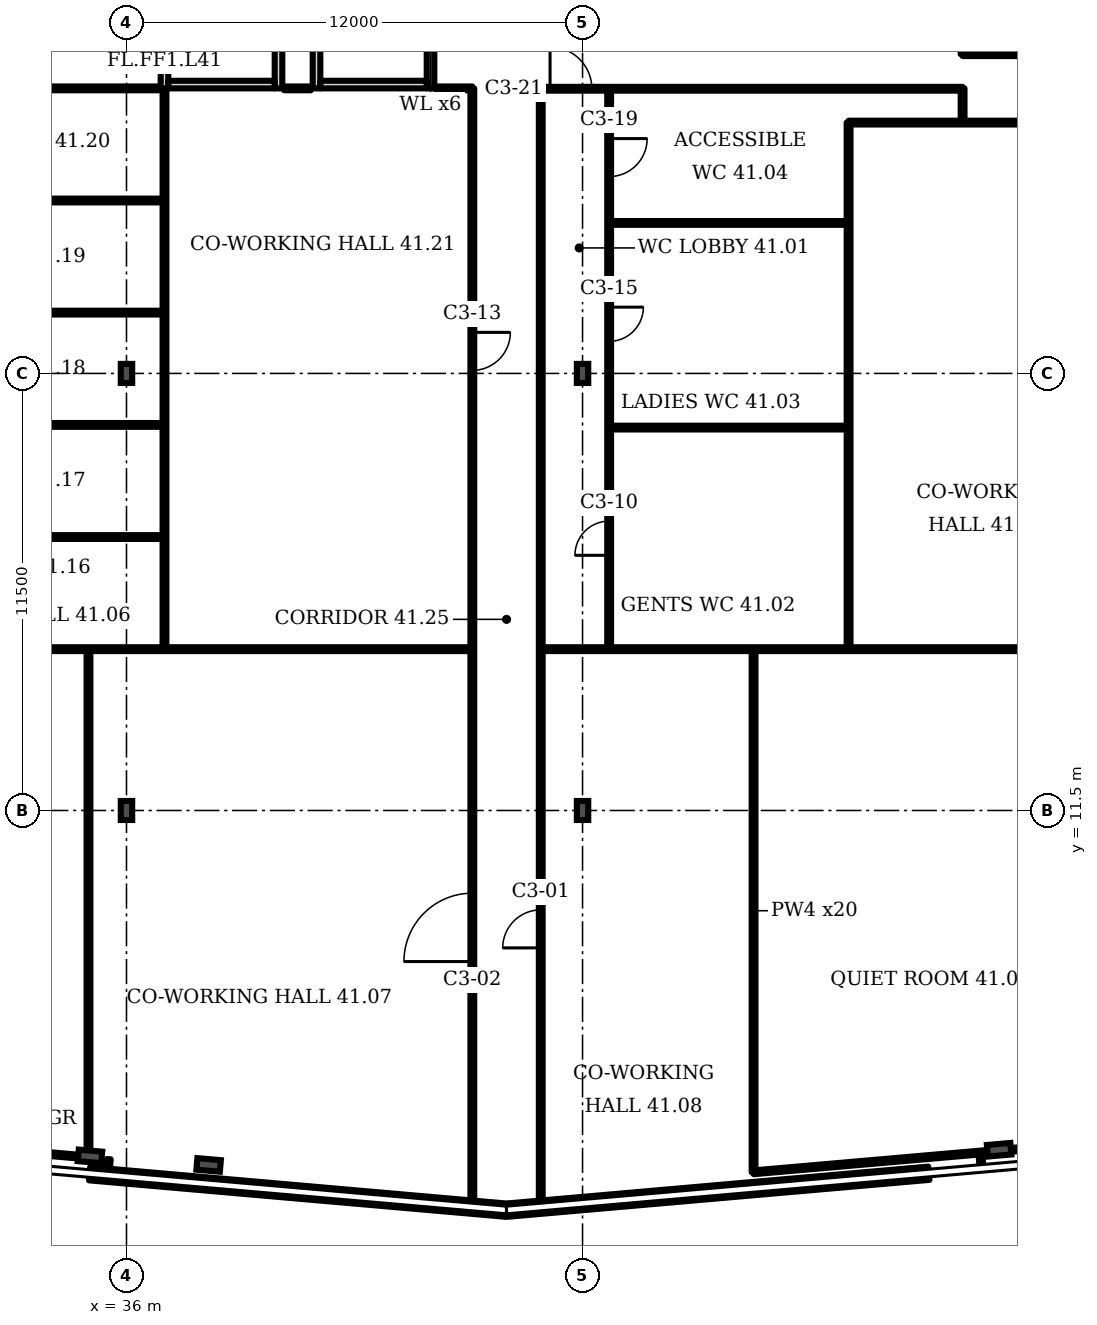
"""IFC4 building model, lengths in metres.
Left out: names, types, materials, properties, quantities, classifications, styles, units other than length and angle.
Written with IfcOpenShell. Run it as: python <this file> out.ifc"""

import sys

from ifc_helpers import new_model, si_unit, direction, frame, frame_2d, origin, origin_2d, place, context, subcontext, project, spatial, rectangle, i_section, extrude, element, fill, save


model = new_model("IFC4")
c1 = context("Model", 3, precision=1e-05, world=origin(), true_north=direction((0.0, 1.0)))
c2 = subcontext(c1, "Body", "Model", "MODEL_VIEW")
j1 = project(units=[si_unit("LENGTHUNIT", "METRE"), si_unit("PLANEANGLEUNIT", "RADIAN")], contexts=[c1])
p1 = place(None, origin())
s1 = spatial("IfcSite", under=j1, at=p1, CompositionType="ELEMENT")
p2 = place(p1, origin())
s2 = spatial("IfcBuilding", under=s1, at=p2, CompositionType="ELEMENT")
p3 = place(p2, frame((0.0, 0.0, 169.9)))
s3 = spatial("IfcBuildingStorey", under=s2, at=p3, CompositionType="ELEMENT", Elevation=169.9)
for number, where, z_axis, x_axis in (
    (1, (35.039, 2.399, 0.0), (0.0, 0.0, 1.0), (-0.087, -0.996, 0.0)),
    (2, (38.161, 2.174, 0.0), (0.0, 0.0, 1.0), (-0.087, -0.996, 0.0)),
    (3, (58.961, 2.573, 0.0), (0.0, 0.0, 1.0), (0.087, -0.996, 0.0)),
):
    element("IfcColumn", number, at=place(p3, frame(where, z_axis=z_axis, x_axis=x_axis)), inside=s3, PredefinedType="COLUMN", context=c2, shape_type="SweptSolid", body=[
        extrude(i_section(OverallWidth=0.305, OverallDepth=0.62, WebThickness=0.021, FlangeThickness=0.04, FilletRadius=0.027, at=origin_2d()), origin(), (0.0, 0.0, 1.0), 3.6),
    ])
for number, where, z_axis, x_axis in (
    (4, (36.0, 11.5, 0.0), (0.0, 0.0, 1.0), (1.0, 0.0, 0.0)),
    (5, (48.0, 11.5, 0.0), (0.0, 0.0, 1.0), (1.0, 0.0, 0.0)),
    (6, (36.0, 23.0, 0.0), (0.0, 0.0, 1.0), (1.0, 0.0, 0.0)),
    (7, (48.0, 23.0, 0.0), (0.0, 0.0, 1.0), (1.0, 0.0, 0.0)),
):
    element("IfcColumn", number, at=place(p3, frame(where, z_axis=z_axis, x_axis=x_axis)), inside=s3, PredefinedType="COLUMN", context=c2, shape_type="SweptSolid", body=[
        extrude(i_section(OverallWidth=0.3, OverallDepth=0.5, WebThickness=0.014, FlangeThickness=0.028, FilletRadius=0.027, at=origin_2d()), origin(), (0.0, 0.0, 1.0), 3.6),
    ])
p4 = place(p3, frame((35.03, 1.943, 0.0), z_axis=(0.0, 0.0, 1.0), x_axis=(0.996199, -0.08714, 0.0)))
e8 = element("IfcWall", 8, at=p4, inside=s3, PredefinedType="SOLIDWALL", context=c2, shape_type="SweptSolid", body=[
    extrude(rectangle(XDim=11.028, YDim=0.35, at=frame_2d((5.514, 0.0))), origin(), (0.0, 0.0, 1.0), 1.0),
])
p5 = place(p3, frame((46.045, 0.987, 0.0), z_axis=(0.0, 0.0, 1.0), x_axis=(0.996193, 0.087171, 0.0)))
e9 = element("IfcWall", 9, at=p5, inside=s3, PredefinedType="SOLIDWALL", context=c2, shape_type="SweptSolid", body=[
    extrude(rectangle(XDim=11.11, YDim=0.35, at=frame_2d((5.555, 0.0))), origin(), (0.0, 0.0, 1.0), 1.0),
])
p6 = place(p3, frame((37.0, 30.5, 0.0), z_axis=(0.0, 0.0, 1.0), x_axis=(0.0, 1.0, 0.0)))
e10 = element("IfcWall", 10, at=p6, inside=s3, PredefinedType="PARTITIONING", context=c2, shape_type="SweptSolid", body=[
    extrude(rectangle(XDim=3.5, YDim=0.2, at=frame_2d((1.75, 0.0))), origin(), (0.0, 0.0, 1.0), 3.2),
])
p7 = place(p6, frame((1.2, 0.0, 0.0)))
e11 = element("IfcOpeningElement", 11, at=p7, cuts=e10, PredefinedType="OPENING", context=c2, shape_type="SweptSolid", body=[
    extrude(rectangle(XDim=1.1, YDim=2.1, at=frame_2d((0.55, 1.05))), frame((0.0, 0.11, 0.0), z_axis=(0.0, -1.0, 0.0), x_axis=(1.0, 0.0, 0.0)), (0.0, 0.0, 1.0), 0.22),
])
p8 = place(p3, frame((40.0, 30.5, 0.0), z_axis=(0.0, 0.0, 1.0), x_axis=(0.0, 1.0, 0.0)))
e12 = element("IfcWall", 12, at=p8, inside=s3, PredefinedType="PARTITIONING", context=c2, shape_type="SweptSolid", body=[
    extrude(rectangle(XDim=3.5, YDim=0.2, at=frame_2d((1.75, 0.0))), origin(), (0.0, 0.0, 1.0), 3.2),
])
p9 = place(p3, frame((37.1, 30.6, 0.0), z_axis=(0.0, 0.0, 1.0), x_axis=(1.0, 0.0, 0.0)))
e13 = element("IfcWall", 13, at=p9, inside=s3, PredefinedType="PARTITIONING", context=c2, shape_type="SweptSolid", body=[
    extrude(rectangle(XDim=2.8, YDim=0.2, at=frame_2d((1.4, 0.0))), origin(), (0.0, 0.0, 1.0), 3.2),
])
p10 = place(p3, frame((41.0, 30.5, 0.0), z_axis=(0.0, 0.0, 1.0), x_axis=(0.0, 1.0, 0.0)))
e14 = element("IfcWall", 14, at=p10, inside=s3, PredefinedType="PARTITIONING", context=c2, shape_type="SweptSolid", body=[
    extrude(rectangle(XDim=3.5, YDim=0.2, at=frame_2d((1.75, 0.0))), origin(), (0.0, 0.0, 1.0), 3.2),
])
p11 = place(p3, frame((44.0, 30.5, 0.0), z_axis=(0.0, 0.0, 1.0), x_axis=(0.0, 1.0, 0.0)))
e15 = element("IfcWall", 15, at=p11, inside=s3, PredefinedType="PARTITIONING", context=c2, shape_type="SweptSolid", body=[
    extrude(rectangle(XDim=3.5, YDim=0.2, at=frame_2d((1.75, 0.0))), origin(), (0.0, 0.0, 1.0), 3.2),
])
p12 = place(p11, frame((1.2, 0.0, 0.0)))
e16 = element("IfcOpeningElement", 16, at=p12, cuts=e15, PredefinedType="OPENING", context=c2, shape_type="SweptSolid", body=[
    extrude(rectangle(XDim=1.1, YDim=2.1, at=frame_2d((0.55, 1.05))), frame((0.0, 0.11, 0.0), z_axis=(0.0, -1.0, 0.0), x_axis=(1.0, 0.0, 0.0)), (0.0, 0.0, 1.0), 0.22),
])
p13 = place(p3, frame((41.1, 30.6, 0.0), z_axis=(0.0, 0.0, 1.0), x_axis=(1.0, 0.0, 0.0)))
e17 = element("IfcWall", 17, at=p13, inside=s3, PredefinedType="PARTITIONING", context=c2, shape_type="SweptSolid", body=[
    extrude(rectangle(XDim=2.8, YDim=0.2, at=frame_2d((1.4, 0.0))), origin(), (0.0, 0.0, 1.0), 3.2),
])
p14 = place(p3, frame((27.4, 15.745, 0.0), z_axis=(0.0, 0.0, 1.0), x_axis=(1.0, 0.0, 0.0)))
e18 = element("IfcWall", 18, at=p14, inside=s3, PredefinedType="PARTITIONING", context=c2, shape_type="SweptSolid", body=[
    extrude(rectangle(XDim=17.7, YDim=0.1, at=frame_2d((8.85, 0.0))), origin(), (0.0, 0.0, 1.0), 3.2),
])
for number, where, z_axis, x_axis in (
    (19, (27.4, 18.695, 0.0), (0.0, 0.0, 1.0), (1.0, 0.0, 0.0)),
    (20, (27.4, 21.645, 0.0), (0.0, 0.0, 1.0), (1.0, 0.0, 0.0)),
    (21, (27.4, 24.6, 0.0), (0.0, 0.0, 1.0), (1.0, 0.0, 0.0)),
    (22, (27.4, 27.55, 0.0), (0.0, 0.0, 1.0), (1.0, 0.0, 0.0)),
):
    element("IfcWall", number, at=place(p3, frame(where, z_axis=z_axis, x_axis=x_axis)), inside=s3, PredefinedType="PARTITIONING", context=c2, shape_type="SweptSolid", body=[
        extrude(rectangle(XDim=9.6, YDim=0.1, at=frame_2d((4.8, 0.0))), origin(), (0.0, 0.0, 1.0), 3.2),
    ])
p15 = place(p3, frame((27.4, 30.5, 0.0), z_axis=(0.0, 0.0, 1.0), x_axis=(1.0, 0.0, 0.0)))
e23 = element("IfcWall", 23, at=p15, inside=s3, PredefinedType="PARTITIONING", context=c2, shape_type="SweptSolid", body=[
    extrude(rectangle(XDim=9.45, YDim=0.1, at=frame_2d((4.725, 0.0))), origin(), (0.0, 0.0, 1.0), 3.2),
])
p16 = place(p15, frame((2.87, 0.0, 0.0)))
e24 = element("IfcOpeningElement", 24, at=p16, cuts=e23, PredefinedType="OPENING", context=c2, shape_type="SweptSolid", body=[
    extrude(rectangle(XDim=1.0, YDim=2.1, at=frame_2d((0.5, 1.05))), frame((0.0, 0.06, 0.0), z_axis=(0.0, -1.0, 0.0), x_axis=(1.0, 0.0, 0.0)), (0.0, 0.0, 1.0), 0.12),
])
p17 = place(p3, frame((35.0, 2.37, 0.0), z_axis=(0.0, 0.0, 1.0), x_axis=(-0.996265, 0.086343, 0.0)))
e25 = element("IfcWall", 25, at=p17, inside=s3, PredefinedType="PARTITIONING", context=c2, shape_type="SweptSolid", body=[
    extrude(rectangle(XDim=1.948, YDim=0.1, at=frame_2d((0.974, 0.0))), origin(), (0.0, 0.0, 1.0), 2.58),
])
p18 = place(p3, frame((35.0, 2.37, 0.0), z_axis=(0.0, 0.0, 1.0), x_axis=(0.0, 1.0, 0.0)))
e26 = element("IfcWall", 26, at=p18, inside=s3, PredefinedType="PARTITIONING", context=c2, shape_type="SweptSolid", body=[
    extrude(rectangle(XDim=13.375, YDim=0.1, at=frame_2d((6.688, 0.0))), origin(), (0.0, 0.0, 1.0), 3.2),
])
p19 = place(p3, frame((35.502, 1.927, 0.0), z_axis=(0.0, 0.0, 1.0), x_axis=(0.083045, 0.996542, 0.0)))
e27 = element("IfcWall", 27, at=p19, inside=s3, PredefinedType="PARTITIONING", context=c2, shape_type="SweptSolid", body=[
    extrude(rectangle(XDim=0.4, YDim=0.1, at=frame_2d((0.2, 0.0))), origin(), (0.0, 0.0, 1.0), 3.2),
])
p20 = place(p3, frame((37.0, 15.745, 0.0), z_axis=(0.0, 0.0, 1.0), x_axis=(0.0, 1.0, 0.0)))
e28 = element("IfcWall", 28, at=p20, inside=s3, PredefinedType="PARTITIONING", context=c2, shape_type="SweptSolid", body=[
    extrude(rectangle(XDim=14.755, YDim=0.1, at=frame_2d((7.377, 0.0))), origin(), (0.0, 0.0, 1.0), 3.2),
])
p21 = place(p3, frame((45.1, 1.087, 0.0), z_axis=(0.0, 0.0, 1.0), x_axis=(0.0, 1.0, 0.0)))
e29 = element("IfcWall", 29, at=p21, inside=s3, PredefinedType="PARTITIONING", context=c2, shape_type="SweptSolid", body=[
    extrude(rectangle(XDim=29.413, YDim=0.1, at=frame_2d((14.707, 0.0))), origin(), (0.0, 0.0, 1.0), 3.2),
])
p22 = place(p21, frame((6.438, 0.0, 0.0)))
e30 = element("IfcOpeningElement", 30, at=p22, cuts=e29, PredefinedType="OPENING", context=c2, shape_type="SweptSolid", body=[
    extrude(rectangle(XDim=1.8, YDim=2.1, at=frame_2d((0.9, 1.05))), frame((0.0, 0.06, 0.0), z_axis=(0.0, -1.0, 0.0), x_axis=(1.0, 0.0, 0.0)), (0.0, 0.0, 1.0), 0.12),
])
p23 = place(p21, frame((21.993, 0.0, 0.0)))
e31 = element("IfcOpeningElement", 31, at=p23, cuts=e29, PredefinedType="OPENING", context=c2, shape_type="SweptSolid", body=[
    extrude(rectangle(XDim=1.0, YDim=2.1, at=frame_2d((0.5, 1.05))), frame((0.0, 0.06, 0.0), z_axis=(0.0, -1.0, 0.0), x_axis=(1.0, 0.0, 0.0)), (0.0, 0.0, 1.0), 0.12),
])
p24 = place(p3, frame((46.9, 1.087, 0.0), z_axis=(0.0, 0.0, 1.0), x_axis=(0.0, 1.0, 0.0)))
e32 = element("IfcWall", 32, at=p24, inside=s3, PredefinedType="PARTITIONING", context=c2, shape_type="SweptSolid", body=[
    extrude(rectangle(XDim=29.403, YDim=0.1, at=frame_2d((14.702, 0.0))), origin(), (0.0, 0.0, 1.0), 3.2),
])
p25 = place(p24, frame((6.798, 0.0, 0.0)))
e33 = element("IfcOpeningElement", 33, at=p25, cuts=e32, PredefinedType="OPENING", context=c2, shape_type="SweptSolid", body=[
    extrude(rectangle(XDim=1.0, YDim=2.1, at=frame_2d((0.5, 1.05))), frame((0.0, 0.06, 0.0), z_axis=(0.0, -1.0, 0.0), x_axis=(1.0, 0.0, 0.0)), (0.0, 0.0, 1.0), 0.12),
])
p26 = place(p3, frame((46.91, 15.745, 0.0), z_axis=(0.0, 0.0, 1.0), x_axis=(1.0, 0.0, 0.0)))
e34 = element("IfcWall", 34, at=p26, inside=s3, PredefinedType="PARTITIONING", context=c2, shape_type="SweptSolid", body=[
    extrude(rectangle(XDim=17.69, YDim=0.1, at=frame_2d((8.845, 0.0))), origin(), (0.0, 0.0, 1.0), 3.2),
])
p27 = place(p3, frame((46.91, 30.49, 0.0), z_axis=(0.0, 0.0, 1.0), x_axis=(1.0, 0.0, 0.0)))
e35 = element("IfcWall", 35, at=p27, inside=s3, PredefinedType="PARTITIONING", context=c2, shape_type="SweptSolid", body=[
    extrude(rectangle(XDim=11.09, YDim=0.1, at=frame_2d((5.545, 0.0))), origin(), (0.0, 0.0, 1.0), 3.2),
])
p28 = place(p27, frame((0.235, 0.0, 0.0)))
e36 = element("IfcOpeningElement", 36, at=p28, cuts=e35, PredefinedType="OPENING", context=c2, shape_type="SweptSolid", body=[
    extrude(rectangle(XDim=1.1, YDim=2.1, at=frame_2d((0.55, 1.05))), frame((0.0, 0.06, 0.0), z_axis=(0.0, -1.0, 0.0), x_axis=(1.0, 0.0, 0.0)), (0.0, 0.0, 1.0), 0.12),
])
p29 = place(p3, frame((48.7, 15.745, 0.0), z_axis=(0.0, 0.0, 1.0), x_axis=(0.0, 1.0, 0.0)))
e37 = element("IfcWall", 37, at=p29, inside=s3, PredefinedType="PARTITIONING", context=c2, shape_type="SweptSolid", body=[
    extrude(rectangle(XDim=14.745, YDim=0.1, at=frame_2d((7.373, 0.0))), origin(), (0.0, 0.0, 1.0), 3.2),
])
p30 = place(p29, frame((2.469, 0.0, 0.0)))
e38 = element("IfcOpeningElement", 38, at=p30, cuts=e37, PredefinedType="OPENING", context=c2, shape_type="SweptSolid", body=[
    extrude(rectangle(XDim=0.9, YDim=2.1, at=frame_2d((0.45, 1.05))), frame((0.0, 0.06, 0.0), z_axis=(0.0, -1.0, 0.0), x_axis=(1.0, 0.0, 0.0)), (0.0, 0.0, 1.0), 0.12),
])
p31 = place(p29, frame((8.099, 0.0, 0.0)))
e39 = element("IfcOpeningElement", 39, at=p31, cuts=e37, PredefinedType="OPENING", context=c2, shape_type="SweptSolid", body=[
    extrude(rectangle(XDim=0.9, YDim=2.1, at=frame_2d((0.45, 1.05))), frame((0.0, 0.06, 0.0), z_axis=(0.0, -1.0, 0.0), x_axis=(1.0, 0.0, 0.0)), (0.0, 0.0, 1.0), 0.12),
])
p32 = place(p29, frame((12.434, 0.0, 0.0)))
e40 = element("IfcOpeningElement", 40, at=p32, cuts=e37, PredefinedType="OPENING", context=c2, shape_type="SweptSolid", body=[
    extrude(rectangle(XDim=1.0, YDim=2.1, at=frame_2d((0.5, 1.05))), frame((0.0, 0.06, 0.0), z_axis=(0.0, -1.0, 0.0), x_axis=(1.0, 0.0, 0.0)), (0.0, 0.0, 1.0), 0.12),
])
for number, where, z_axis, x_axis in (
    (41, (48.7, 21.575, 0.0), (0.0, 0.0, 1.0), (1.0, 0.0, 0.0)),
    (42, (48.7, 26.96, 0.0), (0.0, 0.0, 1.0), (1.0, 0.0, 0.0)),
):
    element("IfcWall", number, at=place(p3, frame(where, z_axis=z_axis, x_axis=x_axis)), inside=s3, PredefinedType="PARTITIONING", context=c2, shape_type="SweptSolid", body=[
        extrude(rectangle(XDim=6.3, YDim=0.1, at=frame_2d((3.15, 0.0))), origin(), (0.0, 0.0, 1.0), 3.2),
    ])
p33 = place(p3, frame((52.5, 1.98, 0.0), z_axis=(0.0, 0.0, 1.0), x_axis=(0.0, 1.0, 0.0)))
e43 = element("IfcWall", 43, at=p33, inside=s3, PredefinedType="PARTITIONING", context=c2, shape_type="SweptSolid", body=[
    extrude(rectangle(XDim=13.765, YDim=0.1, at=frame_2d((6.883, 0.0))), origin(), (0.0, 0.0, 1.0), 3.2),
])
p34 = place(p3, frame((52.5, 1.98, 0.0), z_axis=(0.0, 0.0, 1.0), x_axis=(0.99622, 0.086844, 0.0)))
e44 = element("IfcWall", 44, at=p34, inside=s3, PredefinedType="PARTITIONING", context=c2, shape_type="SweptSolid", body=[
    extrude(rectangle(XDim=9.328, YDim=0.1, at=frame_2d((4.664, 0.0))), origin(), (0.0, 0.0, 1.0), 2.58),
])
p35 = place(p3, frame((55.0, 15.745, 0.0), z_axis=(0.0, 0.0, 1.0), x_axis=(0.0, 1.0, 0.0)))
e45 = element("IfcWall", 45, at=p35, inside=s3, PredefinedType="PARTITIONING", context=c2, shape_type="SweptSolid", body=[
    extrude(rectangle(XDim=13.855, YDim=0.1, at=frame_2d((6.927, 0.0))), origin(), (0.0, 0.0, 1.0), 3.2),
])
p36 = place(p3, frame((55.0, 29.6, 0.0), z_axis=(0.0, 0.0, 1.0), x_axis=(1.0, 0.0, 0.0)))
e46 = element("IfcWall", 46, at=p36, inside=s3, PredefinedType="PARTITIONING", context=c2, shape_type="SweptSolid", body=[
    extrude(rectangle(XDim=6.44, YDim=0.1, at=frame_2d((3.22, 0.0))), origin(), (0.0, 0.0, 1.0), 3.2),
])
p37 = place(p3, frame((58.0, 29.6, 0.0), z_axis=(0.0, 0.0, 1.0), x_axis=(0.0, 1.0, 0.0)))
e47 = element("IfcWall", 47, at=p37, inside=s3, PredefinedType="PARTITIONING", context=c2, shape_type="SweptSolid", body=[
    extrude(rectangle(XDim=0.9, YDim=0.1, at=frame_2d((0.45, 0.0))), origin(), (0.0, 0.0, 1.0), 3.2),
])
p38 = place(p3, frame((58.0, 31.4, 0.0), z_axis=(0.0, 0.0, 1.0), x_axis=(0.0, 1.0, 0.0)))
e48 = element("IfcWall", 48, at=p38, inside=s3, PredefinedType="PARTITIONING", context=c2, shape_type="SweptSolid", body=[
    extrude(rectangle(XDim=2.58, YDim=0.1, at=frame_2d((1.29, 0.0))), origin(), (0.0, 0.0, 1.0), 3.2),
])
p39 = place(p3, frame((58.0, 31.4, 0.0), z_axis=(0.0, 0.0, 1.0), x_axis=(1.0, 0.0, 0.0)))
e49 = element("IfcWall", 49, at=p39, inside=s3, PredefinedType="PARTITIONING", context=c2, shape_type="SweptSolid", body=[
    extrude(rectangle(XDim=8.4, YDim=0.1, at=frame_2d((4.2, 0.0))), origin(), (0.0, 0.0, 1.0), 3.2),
])
p40 = place(p39, frame((3.98, 0.0, 0.0)))
e50 = element("IfcOpeningElement", 50, at=p40, cuts=e49, PredefinedType="OPENING", context=c2, shape_type="SweptSolid", body=[
    extrude(rectangle(XDim=1.8, YDim=2.1, at=frame_2d((0.9, 1.05))), frame((0.0, 0.06, 0.0), z_axis=(0.0, -1.0, 0.0), x_axis=(1.0, 0.0, 0.0)), (0.0, 0.0, 1.0), 0.12),
])
p41 = place(p3, frame((58.498, 2.102, 0.0), z_axis=(0.0, 0.0, 1.0), x_axis=(-0.083045, 0.996542, 0.0)))
e51 = element("IfcWall", 51, at=p41, inside=s3, PredefinedType="PARTITIONING", context=c2, shape_type="SweptSolid", body=[
    extrude(rectangle(XDim=0.4, YDim=0.1, at=frame_2d((0.2, 0.0))), origin(), (0.0, 0.0, 1.0), 3.2),
])
p42 = place(p3, frame((40.15, 30.5, 0.0), z_axis=(0.0, 0.0, 1.0), x_axis=(1.0, 0.0, 0.0)))
e52 = element("IfcWall", 52, at=p42, inside=s3, PredefinedType="PARTITIONING", context=c2, shape_type="SweptSolid", body=[
    extrude(rectangle(XDim=0.7, YDim=0.1, at=frame_2d((0.35, 0.0))), origin(), (0.0, 0.0, 1.0), 3.2),
])
p43 = place(p3, frame((44.15, 30.5, 0.0), z_axis=(0.0, 0.0, 1.0), x_axis=(1.0, 0.0, 0.0)))
e53 = element("IfcWall", 53, at=p43, inside=s3, PredefinedType="PARTITIONING", context=c2, shape_type="SweptSolid", body=[
    extrude(rectangle(XDim=0.95, YDim=0.1, at=frame_2d((0.475, 0.0))), origin(), (0.0, 0.0, 1.0), 3.2),
])
p44 = place(p25, origin())
e54 = element("IfcDoor", 54, at=p44, inside=s3, OperationType="SINGLE_SWING_LEFT", PredefinedType="DOOR", context=c2, shape_type="SweptSolid", body=[
    extrude(rectangle(XDim=1.0, YDim=2.1, at=frame_2d((0.5, 1.05))), frame((0.0, 0.025, 0.0), z_axis=(0.0, -1.0, 0.0), x_axis=(1.0, 0.0, 0.0)), (0.0, 0.0, 1.0), 0.05),
])
fill(e33, e54)
p45 = place(p22, origin())
e55 = element("IfcDoor", 55, at=p45, inside=s3, OperationType="DOUBLE_DOOR_SINGLE_SWING", PredefinedType="DOOR", context=c2, shape_type="SweptSolid", body=[
    extrude(rectangle(XDim=1.8, YDim=2.1, at=frame_2d((0.9, 1.05))), frame((0.0, 0.025, 0.0), z_axis=(0.0, -1.0, 0.0), x_axis=(1.0, 0.0, 0.0)), (0.0, 0.0, 1.0), 0.05),
])
fill(e30, e55)
p46 = place(p30, origin())
e56 = element("IfcDoor", 56, at=p46, inside=s3, OperationType="SINGLE_SWING_LEFT", PredefinedType="DOOR", context=c2, shape_type="SweptSolid", body=[
    extrude(rectangle(XDim=0.9, YDim=2.1, at=frame_2d((0.45, 1.05))), frame((0.0, 0.025, 0.0), z_axis=(0.0, -1.0, 0.0), x_axis=(1.0, 0.0, 0.0)), (0.0, 0.0, 1.0), 0.05),
])
fill(e38, e56)
p47 = place(p23, origin())
e57 = element("IfcDoor", 57, at=p47, inside=s3, OperationType="SINGLE_SWING_RIGHT", PredefinedType="DOOR", context=c2, shape_type="SweptSolid", body=[
    extrude(rectangle(XDim=1.0, YDim=2.1, at=frame_2d((0.5, 1.05))), frame((0.0, 0.025, 0.0), z_axis=(0.0, -1.0, 0.0), x_axis=(1.0, 0.0, 0.0)), (0.0, 0.0, 1.0), 0.05),
])
fill(e31, e57)
p48 = place(p31, origin())
e58 = element("IfcDoor", 58, at=p48, inside=s3, OperationType="SINGLE_SWING_RIGHT", PredefinedType="DOOR", context=c2, shape_type="SweptSolid", body=[
    extrude(rectangle(XDim=0.9, YDim=2.1, at=frame_2d((0.45, 1.05))), frame((0.0, 0.025, 0.0), z_axis=(0.0, -1.0, 0.0), x_axis=(1.0, 0.0, 0.0)), (0.0, 0.0, 1.0), 0.05),
])
fill(e39, e58)
p49 = place(p32, origin())
e59 = element("IfcDoor", 59, at=p49, inside=s3, OperationType="SINGLE_SWING_RIGHT", PredefinedType="DOOR", context=c2, shape_type="SweptSolid", body=[
    extrude(rectangle(XDim=1.0, YDim=2.1, at=frame_2d((0.5, 1.05))), frame((0.0, 0.025, 0.0), z_axis=(0.0, -1.0, 0.0), x_axis=(1.0, 0.0, 0.0)), (0.0, 0.0, 1.0), 0.05),
])
fill(e40, e59)
p50 = place(p28, origin())
e60 = element("IfcDoor", 60, at=p50, inside=s3, OperationType="SINGLE_SWING_LEFT", PredefinedType="DOOR", context=c2, shape_type="SweptSolid", body=[
    extrude(rectangle(XDim=1.1, YDim=2.1, at=frame_2d((0.55, 1.05))), frame((0.0, 0.025, 0.0), z_axis=(0.0, -1.0, 0.0), x_axis=(1.0, 0.0, 0.0)), (0.0, 0.0, 1.0), 0.05),
])
fill(e36, e60)
save(model, sys.argv[1])
